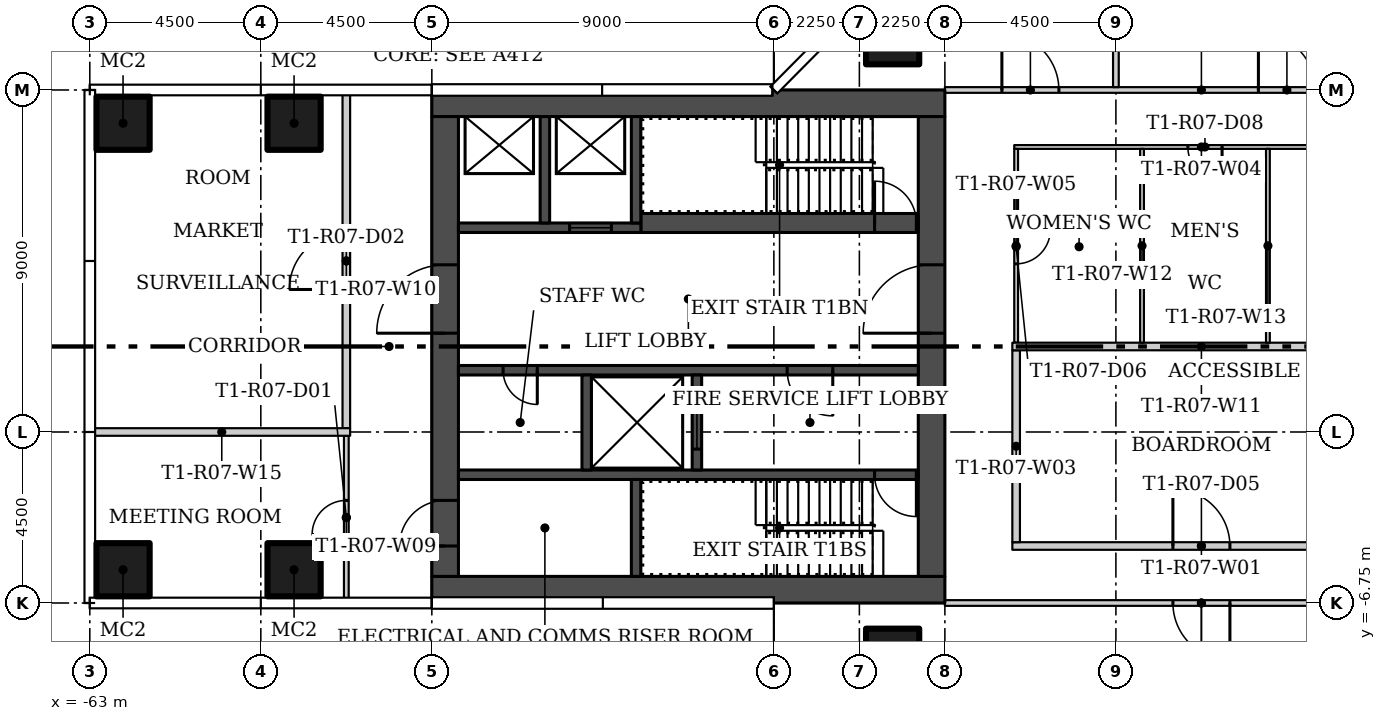
"""IFC4 building model, lengths in metres.
Left out: names, types, materials, properties, quantities, classifications, styles, units other than length and angle.
Written with IfcOpenShell. Run it as: python <this file> out.ifc"""

import sys

from ifc_helpers import new_model, si_unit, direction, frame, frame_2d, origin, origin_2d, place, context, subcontext, project, spatial, rectangle, hollow_rectangle, extrude, element, fill, save


model = new_model("IFC4")
c1 = context("Model", 3, precision=1e-05, world=origin(), true_north=direction((0.0, 1.0)))
c2 = subcontext(c1, "Body", "Model", "MODEL_VIEW")
j1 = project(units=[si_unit("LENGTHUNIT", "METRE"), si_unit("PLANEANGLEUNIT", "RADIAN")], contexts=[c1])
p1 = place(None, origin())
s1 = spatial("IfcSite", under=j1, at=p1, CompositionType="ELEMENT")
p2 = place(p1, origin())
s2 = spatial("IfcBuilding", under=s1, at=p2, CompositionType="ELEMENT")
p3 = place(p2, frame((0.0, 0.0, 69.3)))
s3 = spatial("IfcBuildingStorey", under=s2, at=p3, CompositionType="ELEMENT", Elevation=69.3)
for number, where in (
    (1, (-41.875, 8.125, 0.0)),
    (2, (-41.875, -8.125, 0.0)),
    (3, (-57.625, -5.875, 0.0)),
    (4, (-62.125, -5.875, 0.0)),
    (5, (-57.625, 5.875, 0.0)),
    (6, (-62.125, 5.875, 0.0)),
):
    element("IfcColumn", number, at=place(p3, frame(where)), inside=s3, PredefinedType="COLUMN", context=c2, shape_type="SweptSolid", body=[
        extrude(hollow_rectangle(XDim=1.4, YDim=1.4, WallThickness=0.05, at=origin_2d()), origin(), (0.0, 0.0, 1.0), 3.55),
    ])
p4 = place(p3, frame((-38.725, -5.25, 0.0)))
e7 = element("IfcWall", 7, at=p4, inside=s3, PredefinedType="PARTITIONING", context=c2, shape_type="SweptSolid", body=[
    extrude(rectangle(XDim=9.95, YDim=0.2, at=frame_2d((4.975, 0.0))), origin(), (0.0, 0.0, 1.0), 3.55),
])
p5 = place(p4, frame((4.225, 0.0, 0.0)))
e8 = element("IfcOpeningElement", 8, at=p5, cuts=e7, PredefinedType="OPENING", context=c2, shape_type="SweptSolid", body=[
    extrude(rectangle(XDim=1.5, YDim=2.4, at=frame_2d((0.75, 1.2))), frame((0.0, 0.11, 0.0), z_axis=(0.0, -1.0, 0.0), x_axis=(1.0, 0.0, 0.0)), (0.0, 0.0, 1.0), 0.22),
])
p6 = place(p3, frame((-38.625, -0.1, 0.0), z_axis=(0.0, 0.0, 1.0), x_axis=(0.0, -1.0, 0.0)))
e9 = element("IfcWall", 9, at=p6, inside=s3, PredefinedType="PARTITIONING", context=c2, shape_type="SweptSolid", body=[
    extrude(rectangle(XDim=5.05, YDim=0.2, at=frame_2d((2.525, 0.0))), origin(), (0.0, 0.0, 1.0), 3.55),
])
p7 = place(p3, frame((-28.825, 5.25, 0.0), z_axis=(0.0, 0.0, 1.0), x_axis=(-1.0, 0.0, 0.0)))
e10 = element("IfcWall", 10, at=p7, inside=s3, PredefinedType="PARTITIONING", context=c2, shape_type="SweptSolid", body=[
    extrude(rectangle(XDim=9.85, YDim=0.1, at=frame_2d((4.925, 0.0))), origin(), (0.0, 0.0, 1.0), 3.55),
])
p8 = place(p7, frame((4.381, 0.0, 0.0)))
e11 = element("IfcOpeningElement", 11, at=p8, cuts=e10, PredefinedType="OPENING", context=c2, shape_type="SweptSolid", body=[
    extrude(rectangle(XDim=0.9, YDim=2.1, at=frame_2d((0.45, 1.05))), frame((0.0, 0.06, 0.0), z_axis=(0.0, -1.0, 0.0), x_axis=(1.0, 0.0, 0.0)), (0.0, 0.0, 1.0), 0.12),
])
p9 = place(p3, frame((-38.625, 5.2, 0.0), z_axis=(0.0, 0.0, 1.0), x_axis=(0.0, -1.0, 0.0)))
e12 = element("IfcWall", 12, at=p9, inside=s3, PredefinedType="PARTITIONING", context=c2, shape_type="SweptSolid", body=[
    extrude(rectangle(XDim=5.1, YDim=0.1, at=frame_2d((2.55, 0.0))), origin(), (0.0, 0.0, 1.0), 3.55),
])
p10 = place(p9, frame((2.125, 0.0, 0.0)))
e13 = element("IfcOpeningElement", 13, at=p10, cuts=e12, PredefinedType="OPENING", context=c2, shape_type="SweptSolid", body=[
    extrude(rectangle(XDim=0.9, YDim=2.1, at=frame_2d((0.45, 1.05))), frame((0.0, 0.06, 0.0), z_axis=(0.0, -1.0, 0.0), x_axis=(1.0, 0.0, 0.0)), (0.0, 0.0, 1.0), 0.12),
])
p11 = place(p3, frame((-40.5, 6.75, 0.0)))
e14 = element("IfcWall", 14, at=p11, inside=s3, PredefinedType="PARTITIONING", context=c2, shape_type="SweptSolid", body=[
    extrude(rectangle(XDim=13.5, YDim=0.15, at=frame_2d((6.75, 0.0))), origin(), (0.0, 0.0, 1.0), 3.55),
])
p12 = place(p11, frame((1.5, 0.0, 0.0)))
e15 = element("IfcOpeningElement", 15, at=p12, cuts=e14, PredefinedType="OPENING", context=c2, shape_type="SweptSolid", body=[
    extrude(rectangle(XDim=1.5, YDim=2.1, at=frame_2d((0.75, 1.05))), frame((0.0, 0.085, 0.0), z_axis=(0.0, -1.0, 0.0), x_axis=(1.0, 0.0, 0.0)), (0.0, 0.0, 1.0), 0.17),
])
p13 = place(p11, frame((8.25, 0.0, 0.0)))
e16 = element("IfcOpeningElement", 16, at=p13, cuts=e14, PredefinedType="OPENING", context=c2, shape_type="SweptSolid", body=[
    extrude(rectangle(XDim=1.5, YDim=2.1, at=frame_2d((0.75, 1.05))), frame((0.0, 0.085, 0.0), z_axis=(0.0, -1.0, 0.0), x_axis=(1.0, 0.0, 0.0)), (0.0, 0.0, 1.0), 0.17),
])
p14 = place(p3, frame((-27.0, -6.75, 0.0), z_axis=(0.0, 0.0, 1.0), x_axis=(-1.0, 0.0, 0.0)))
e17 = element("IfcWall", 17, at=p14, inside=s3, PredefinedType="PARTITIONING", context=c2, shape_type="SweptSolid", body=[
    extrude(rectangle(XDim=13.5, YDim=0.15, at=frame_2d((6.75, 0.0))), origin(), (0.0, 0.0, 1.0), 3.55),
])
p15 = place(p14, frame((6.0, 0.0, 0.0)))
e18 = element("IfcOpeningElement", 18, at=p15, cuts=e17, PredefinedType="OPENING", context=c2, shape_type="SweptSolid", body=[
    extrude(rectangle(XDim=1.5, YDim=2.1, at=frame_2d((0.75, 1.05))), frame((0.0, 0.085, 0.0), z_axis=(0.0, -1.0, 0.0), x_axis=(1.0, 0.0, 0.0)), (0.0, 0.0, 1.0), 0.17),
])
p16 = place(p3, frame((-56.25, -6.655, 0.0), z_axis=(0.0, 0.0, 1.0), x_axis=(0.0, 1.0, 0.0)))
e19 = element("IfcWall", 19, at=p16, inside=s3, PredefinedType="PARTITIONING", context=c2, shape_type="SweptSolid", body=[
    extrude(rectangle(XDim=4.305, YDim=0.125, at=frame_2d((2.152, 0.0))), origin(), (0.0, 0.0, 1.0), 3.55),
])
p17 = place(p16, frame((1.705, 0.0, 0.0)))
e20 = element("IfcOpeningElement", 20, at=p17, cuts=e19, PredefinedType="OPENING", context=c2, shape_type="SweptSolid", body=[
    extrude(rectangle(XDim=0.9, YDim=2.1, at=frame_2d((0.45, 1.05))), frame((0.0, 0.073, 0.0), z_axis=(0.0, -1.0, 0.0), x_axis=(1.0, 0.0, 0.0)), (0.0, 0.0, 1.0), 0.145),
])
p18 = place(p3, frame((-56.25, -2.15, 0.0), z_axis=(0.0, 0.0, 1.0), x_axis=(0.0, 1.0, 0.0)))
e21 = element("IfcWall", 21, at=p18, inside=s3, PredefinedType="PARTITIONING", context=c2, shape_type="SweptSolid", body=[
    extrude(rectangle(XDim=8.805, YDim=0.2, at=frame_2d((4.402, 0.0))), origin(), (0.0, 0.0, 1.0), 3.55),
])
p19 = place(p18, frame((3.65, 0.0, 0.0)))
e22 = element("IfcOpeningElement", 22, at=p19, cuts=e21, PredefinedType="OPENING", context=c2, shape_type="SweptSolid", body=[
    extrude(rectangle(XDim=1.5, YDim=2.1, at=frame_2d((0.75, 1.05))), frame((0.0, 0.11, 0.0), z_axis=(0.0, -1.0, 0.0), x_axis=(1.0, 0.0, 0.0)), (0.0, 0.0, 1.0), 0.22),
])
p20 = place(p3, frame((-28.775, 0.0, 0.0), z_axis=(0.0, 0.0, 1.0), x_axis=(-1.0, 0.0, 0.0)))
e23 = element("IfcWall", 23, at=p20, inside=s3, PredefinedType="PARTITIONING", context=c2, shape_type="SweptSolid", body=[
    extrude(rectangle(XDim=9.95, YDim=0.2, at=frame_2d((4.975, 0.0))), origin(), (0.0, 0.0, 1.0), 3.55),
])
for number, where, z_axis, x_axis in (
    (24, (-35.312, 0.1, 0.0), (0.0, 0.0, 1.0), (0.0, 1.0, 0.0)),
    (25, (-32.0, 0.1, 0.0), (0.0, 0.0, 1.0), (0.0, 1.0, 0.0)),
):
    element("IfcWall", number, at=place(p3, frame(where, z_axis=z_axis, x_axis=x_axis)), inside=s3, PredefinedType="PARTITIONING", context=c2, shape_type="SweptSolid", body=[
        extrude(rectangle(XDim=5.1, YDim=0.1, at=frame_2d((2.55, 0.0))), origin(), (0.0, 0.0, 1.0), 3.55),
    ])
p21 = place(p3, frame((-36.0, 6.825, 0.0), z_axis=(0.0, 0.0, 1.0), x_axis=(0.0, 1.0, 0.0)))
e26 = element("IfcWall", 26, at=p21, inside=s3, PredefinedType="PARTITIONING", context=c2, shape_type="SweptSolid", body=[
    extrude(rectangle(XDim=17.83, YDim=0.15, at=frame_2d((8.915, 0.0))), origin(), (0.0, 0.0, 1.0), 3.55),
])
p22 = place(p3, frame((-56.15, -2.25, 0.0), z_axis=(0.0, 0.0, 1.0), x_axis=(-1.0, 0.0, 0.0)))
e27 = element("IfcWall", 27, at=p22, inside=s3, PredefinedType="PARTITIONING", context=c2, shape_type="SweptSolid", body=[
    extrude(rectangle(XDim=6.755, YDim=0.2, at=frame_2d((3.377, 0.0))), origin(), (0.0, 0.0, 1.0), 3.55),
])
for number, where, z_axis, x_axis in (
    (28, (-40.5, -6.4, 0.0), (0.0, 0.0, 1.0), (-1.0, 0.0, 0.0)),
    (29, (-40.5, 6.4, 0.0), (0.0, 0.0, 1.0), (-1.0, 0.0, 0.0)),
):
    element("IfcWall", number, at=place(p3, frame(where, z_axis=z_axis, x_axis=x_axis)), inside=s3, PredefinedType="SHEAR", context=c2, shape_type="SweptSolid", body=[
        extrude(rectangle(XDim=13.5, YDim=0.7, at=frame_2d((6.75, 0.0))), origin(), (0.0, 0.0, 1.0), 3.55),
    ])
p23 = place(p3, frame((-40.85, -6.05, 0.0), z_axis=(0.0, 0.0, 1.0), x_axis=(0.0, 1.0, 0.0)))
e30 = element("IfcWall", 30, at=p23, inside=s3, PredefinedType="SHEAR", context=c2, shape_type="SweptSolid", body=[
    extrude(rectangle(XDim=12.1, YDim=0.7, at=frame_2d((6.05, 0.0))), origin(), (0.0, 0.0, 1.0), 3.55),
])
p24 = place(p23, frame((6.4, 0.0, 0.0)))
e31 = element("IfcOpeningElement", 31, at=p24, cuts=e30, PredefinedType="OPENING", context=c2, shape_type="SweptSolid", body=[
    extrude(rectangle(XDim=1.8, YDim=2.4, at=frame_2d((0.9, 1.2))), frame((0.0, 0.36, 0.0), z_axis=(0.0, -1.0, 0.0), x_axis=(1.0, 0.0, 0.0)), (0.0, 0.0, 1.0), 0.72),
])
p25 = place(p3, frame((-53.65, -6.05, 0.0), z_axis=(0.0, 0.0, 1.0), x_axis=(0.0, 1.0, 0.0)))
e32 = element("IfcWall", 32, at=p25, inside=s3, PredefinedType="SHEAR", context=c2, shape_type="SweptSolid", body=[
    extrude(rectangle(XDim=12.1, YDim=0.7, at=frame_2d((6.05, 0.0))), origin(), (0.0, 0.0, 1.0), 3.55),
])
p26 = place(p25, frame((0.8, 0.0, 0.0)))
e33 = element("IfcOpeningElement", 33, at=p26, cuts=e32, PredefinedType="OPENING", context=c2, shape_type="SweptSolid", body=[
    extrude(rectangle(XDim=1.2, YDim=2.1, at=frame_2d((0.6, 1.05))), frame((0.0, 0.36, 0.0), z_axis=(0.0, -1.0, 0.0), x_axis=(1.0, 0.0, 0.0)), (0.0, 0.0, 1.0), 0.72),
])
p27 = place(p25, frame((6.4, 0.0, 0.0)))
e34 = element("IfcOpeningElement", 34, at=p27, cuts=e32, PredefinedType="OPENING", context=c2, shape_type="SweptSolid", body=[
    extrude(rectangle(XDim=1.8, YDim=2.4, at=frame_2d((0.9, 1.2))), frame((0.0, 0.36, 0.0), z_axis=(0.0, -1.0, 0.0), x_axis=(1.0, 0.0, 0.0)), (0.0, 0.0, 1.0), 0.72),
])
p28 = place(p3, frame((-41.2, -3.375, 0.0), z_axis=(0.0, 0.0, 1.0), x_axis=(-1.0, 0.0, 0.0)))
e35 = element("IfcWall", 35, at=p28, inside=s3, PredefinedType="SHEAR", context=c2, shape_type="SweptSolid", body=[
    extrude(rectangle(XDim=12.1, YDim=0.25, at=frame_2d((6.05, 0.0))), origin(), (0.0, 0.0, 1.0), 3.55),
])
p29 = place(p28, frame((0.05, 0.0, 0.0)))
e36 = element("IfcOpeningElement", 36, at=p29, cuts=e35, PredefinedType="OPENING", context=c2, shape_type="SweptSolid", body=[
    extrude(rectangle(XDim=1.1, YDim=2.1, at=frame_2d((0.55, 1.05))), frame((0.0, 0.135, 0.0), z_axis=(0.0, -1.0, 0.0), x_axis=(1.0, 0.0, 0.0)), (0.0, 0.0, 1.0), 0.27),
])
p30 = place(p3, frame((-48.625, -6.05, 0.0), z_axis=(0.0, 0.0, 1.0), x_axis=(0.0, 1.0, 0.0)))
e37 = element("IfcWall", 37, at=p30, inside=s3, PredefinedType="SHEAR", context=c2, shape_type="SweptSolid", body=[
    extrude(rectangle(XDim=2.55, YDim=0.25, at=frame_2d((1.275, 0.0))), origin(), (0.0, 0.0, 1.0), 3.55),
])
p31 = place(p3, frame((-41.2, -0.625, 0.0), z_axis=(0.0, 0.0, 1.0), x_axis=(-1.0, 0.0, 0.0)))
e38 = element("IfcWall", 38, at=p31, inside=s3, PredefinedType="SHEAR", context=c2, shape_type="SweptSolid", body=[
    extrude(rectangle(XDim=12.1, YDim=0.25, at=frame_2d((6.05, 0.0))), origin(), (0.0, 0.0, 1.0), 3.55),
])
p32 = place(p31, frame((2.25, 0.0, 0.0)))
e39 = element("IfcOpeningElement", 39, at=p32, cuts=e38, PredefinedType="OPENING", context=c2, shape_type="SweptSolid", body=[
    extrude(rectangle(XDim=1.2, YDim=2.1, at=frame_2d((0.6, 1.05))), frame((0.0, 0.135, 0.0), z_axis=(0.0, -1.0, 0.0), x_axis=(1.0, 0.0, 0.0)), (0.0, 0.0, 1.0), 0.27),
])
p33 = place(p31, frame((10.025, 0.0, 0.0)))
e40 = element("IfcOpeningElement", 40, at=p33, cuts=e38, PredefinedType="OPENING", context=c2, shape_type="SweptSolid", body=[
    extrude(rectangle(XDim=0.9, YDim=2.1, at=frame_2d((0.45, 1.05))), frame((0.0, 0.135, 0.0), z_axis=(0.0, -1.0, 0.0), x_axis=(1.0, 0.0, 0.0)), (0.0, 0.0, 1.0), 0.27),
])
p34 = place(p3, frame((-47.025, -3.25, 0.0), z_axis=(0.0, 0.0, 1.0), x_axis=(0.0, 1.0, 0.0)))
e41 = element("IfcWall", 41, at=p34, inside=s3, PredefinedType="SHEAR", context=c2, shape_type="SweptSolid", body=[
    extrude(rectangle(XDim=2.5, YDim=0.25, at=frame_2d((1.25, 0.0))), origin(), (0.0, 0.0, 1.0), 3.55),
])
p35 = place(p34, frame((0.55, 0.0, 0.0)))
e42 = element("IfcOpeningElement", 42, at=p35, cuts=e41, PredefinedType="OPENING", context=c2, shape_type="SweptSolid", body=[
    extrude(rectangle(XDim=1.4, YDim=2.4, at=frame_2d((0.7, 1.2))), frame((0.0, 0.135, 0.0), z_axis=(0.0, -1.0, 0.0), x_axis=(1.0, 0.0, 0.0)), (0.0, 0.0, 1.0), 0.27),
])
p36 = place(p3, frame((-49.925, -3.25, 0.0), z_axis=(0.0, 0.0, 1.0), x_axis=(0.0, 1.0, 0.0)))
e43 = element("IfcWall", 43, at=p36, inside=s3, PredefinedType="SHEAR", context=c2, shape_type="SweptSolid", body=[
    extrude(rectangle(XDim=2.5, YDim=0.25, at=frame_2d((1.25, 0.0))), origin(), (0.0, 0.0, 1.0), 3.55),
])
p37 = place(p3, frame((-48.5, 3.25, 0.0)))
e44 = element("IfcWall", 44, at=p37, inside=s3, PredefinedType="SHEAR", context=c2, shape_type="SweptSolid", body=[
    extrude(rectangle(XDim=7.3, YDim=0.5, at=frame_2d((3.65, 0.0))), origin(), (0.0, 0.0, 1.0), 3.55),
])
p38 = place(p37, frame((6.15, 0.0, 0.0)))
e45 = element("IfcOpeningElement", 45, at=p38, cuts=e44, PredefinedType="OPENING", context=c2, shape_type="SweptSolid", body=[
    extrude(rectangle(XDim=1.1, YDim=2.1, at=frame_2d((0.55, 1.05))), frame((0.0, 0.26, 0.0), z_axis=(0.0, -1.0, 0.0), x_axis=(1.0, 0.0, 0.0)), (0.0, 0.0, 1.0), 0.52),
])
p39 = place(p3, frame((-48.5, 3.125, 0.0), z_axis=(0.0, 0.0, 1.0), x_axis=(-1.0, 0.0, 0.0)))
e46 = element("IfcWall", 46, at=p39, inside=s3, PredefinedType="SHEAR", context=c2, shape_type="SweptSolid", body=[
    extrude(rectangle(XDim=4.8, YDim=0.25, at=frame_2d((2.4, 0.0))), origin(), (0.0, 0.0, 1.0), 3.55),
])
p40 = place(p39, frame((0.775, 0.0, 0.0)))
e47 = element("IfcOpeningElement", 47, at=p40, cuts=e46, PredefinedType="OPENING", context=c2, shape_type="SweptSolid", body=[
    extrude(rectangle(XDim=1.1, YDim=2.1, at=frame_2d((0.55, 1.05))), frame((0.0, 0.135, 0.0), z_axis=(0.0, -1.0, 0.0), x_axis=(1.0, 0.0, 0.0)), (0.0, 0.0, 1.0), 0.27),
])
for number, where, z_axis, x_axis in (
    (48, (-48.625, 3.25, 0.0), (0.0, 0.0, 1.0), (0.0, 1.0, 0.0)),
    (49, (-51.025, 3.25, 0.0), (0.0, 0.0, 1.0), (0.0, 1.0, 0.0)),
):
    element("IfcWall", number, at=place(p3, frame(where, z_axis=z_axis, x_axis=x_axis)), inside=s3, PredefinedType="SHEAR", context=c2, shape_type="SweptSolid", body=[
        extrude(rectangle(XDim=2.8, YDim=0.25, at=frame_2d((1.4, 0.0))), origin(), (0.0, 0.0, 1.0), 3.55),
    ])
p41 = place(p17, origin())
e50 = element("IfcDoor", 50, at=p41, inside=s3, OperationType="SINGLE_SWING_RIGHT", PredefinedType="DOOR", context=c2, shape_type="SweptSolid", body=[
    extrude(rectangle(XDim=0.9, YDim=2.1, at=frame_2d((0.45, 1.05))), frame((0.0, 0.025, 0.0), z_axis=(0.0, -1.0, 0.0), x_axis=(1.0, 0.0, 0.0)), (0.0, 0.0, 1.0), 0.05),
])
fill(e20, e50)
p42 = place(p19, origin())
e51 = element("IfcDoor", 51, at=p42, inside=s3, OperationType="DOUBLE_DOOR_SINGLE_SWING", PredefinedType="DOOR", context=c2, shape_type="SweptSolid", body=[
    extrude(rectangle(XDim=1.5, YDim=2.1, at=frame_2d((0.75, 1.05))), frame((0.0, 0.025, 0.0), z_axis=(0.0, -1.0, 0.0), x_axis=(1.0, 0.0, 0.0)), (0.0, 0.0, 1.0), 0.05),
])
fill(e22, e51)
p43 = place(p12, origin())
e52 = element("IfcDoor", 52, at=p43, inside=s3, OperationType="DOUBLE_DOOR_SINGLE_SWING", PredefinedType="DOOR", context=c2, shape_type="SweptSolid", body=[
    extrude(rectangle(XDim=1.5, YDim=2.1, at=frame_2d((0.75, 1.05))), frame((0.0, 0.025, 0.0), z_axis=(0.0, -1.0, 0.0), x_axis=(1.0, 0.0, 0.0)), (0.0, 0.0, 1.0), 0.05),
])
fill(e15, e52)
p44 = place(p13, origin())
e53 = element("IfcDoor", 53, at=p44, inside=s3, OperationType="DOUBLE_DOOR_SINGLE_SWING", PredefinedType="DOOR", context=c2, shape_type="SweptSolid", body=[
    extrude(rectangle(XDim=1.5, YDim=2.1, at=frame_2d((0.75, 1.05))), frame((0.0, 0.025, 0.0), z_axis=(0.0, -1.0, 0.0), x_axis=(1.0, 0.0, 0.0)), (0.0, 0.0, 1.0), 0.05),
])
fill(e16, e53)
p45 = place(p5, origin())
e54 = element("IfcDoor", 54, at=p45, inside=s3, OperationType="DOUBLE_DOOR_SINGLE_SWING", PredefinedType="DOOR", context=c2, shape_type="SweptSolid", body=[
    extrude(rectangle(XDim=1.5, YDim=2.4, at=frame_2d((0.75, 1.2))), frame((0.0, 0.025, 0.0), z_axis=(0.0, -1.0, 0.0), x_axis=(1.0, 0.0, 0.0)), (0.0, 0.0, 1.0), 0.05),
])
fill(e8, e54)
p46 = place(p10, origin())
e55 = element("IfcDoor", 55, at=p46, inside=s3, OperationType="SINGLE_SWING_LEFT", PredefinedType="DOOR", context=c2, shape_type="SweptSolid", body=[
    extrude(rectangle(XDim=0.9, YDim=2.1, at=frame_2d((0.45, 1.05))), frame((0.0, 0.025, 0.0), z_axis=(0.0, -1.0, 0.0), x_axis=(1.0, 0.0, 0.0)), (0.0, 0.0, 1.0), 0.05),
])
fill(e13, e55)
p47 = place(p8, origin())
e56 = element("IfcDoor", 56, at=p47, inside=s3, OperationType="SINGLE_SWING_RIGHT", PredefinedType="DOOR", context=c2, shape_type="SweptSolid", body=[
    extrude(rectangle(XDim=0.9, YDim=2.1, at=frame_2d((0.45, 1.05))), frame((0.0, 0.025, 0.0), z_axis=(0.0, -1.0, 0.0), x_axis=(1.0, 0.0, 0.0)), (0.0, 0.0, 1.0), 0.05),
])
fill(e11, e56)
p48 = place(p15, origin())
e57 = element("IfcDoor", 57, at=p48, inside=s3, OperationType="DOUBLE_DOOR_SINGLE_SWING", PredefinedType="DOOR", context=c2, shape_type="SweptSolid", body=[
    extrude(rectangle(XDim=1.5, YDim=2.1, at=frame_2d((0.75, 1.05))), frame((0.0, 0.025, 0.0), z_axis=(0.0, -1.0, 0.0), x_axis=(1.0, 0.0, 0.0)), (0.0, 0.0, 1.0), 0.05),
])
fill(e18, e57)
p49 = place(p24, origin())
e58 = element("IfcDoor", 58, at=p49, inside=s3, OperationType="DOUBLE_DOOR_SINGLE_SWING", PredefinedType="DOOR", context=c2, shape_type="SweptSolid", body=[
    extrude(rectangle(XDim=1.8, YDim=2.4, at=frame_2d((0.9, 1.2))), frame((0.0, 0.025, 0.0), z_axis=(0.0, -1.0, 0.0), x_axis=(1.0, 0.0, 0.0)), (0.0, 0.0, 1.0), 0.05),
])
fill(e31, e58)
p50 = place(p26, origin())
e59 = element("IfcDoor", 59, at=p50, inside=s3, OperationType="SINGLE_SWING_LEFT", PredefinedType="DOOR", context=c2, shape_type="SweptSolid", body=[
    extrude(rectangle(XDim=1.2, YDim=2.1, at=frame_2d((0.6, 1.05))), frame((0.0, 0.025, 0.0), z_axis=(0.0, -1.0, 0.0), x_axis=(1.0, 0.0, 0.0)), (0.0, 0.0, 1.0), 0.05),
])
fill(e33, e59)
p51 = place(p27, origin())
e60 = element("IfcDoor", 60, at=p51, inside=s3, OperationType="DOUBLE_DOOR_SINGLE_SWING", PredefinedType="DOOR", context=c2, shape_type="SweptSolid", body=[
    extrude(rectangle(XDim=1.8, YDim=2.4, at=frame_2d((0.9, 1.2))), frame((0.0, 0.025, 0.0), z_axis=(0.0, -1.0, 0.0), x_axis=(1.0, 0.0, 0.0)), (0.0, 0.0, 1.0), 0.05),
])
fill(e34, e60)
p52 = place(p29, origin())
e61 = element("IfcDoor", 61, at=p52, inside=s3, OperationType="SINGLE_SWING_LEFT", PredefinedType="DOOR", context=c2, shape_type="SweptSolid", body=[
    extrude(rectangle(XDim=1.1, YDim=2.1, at=frame_2d((0.55, 1.05))), frame((0.0, 0.025, 0.0), z_axis=(0.0, -1.0, 0.0), x_axis=(1.0, 0.0, 0.0)), (0.0, 0.0, 1.0), 0.05),
])
fill(e36, e61)
p53 = place(p32, origin())
e62 = element("IfcDoor", 62, at=p53, inside=s3, OperationType="SINGLE_SWING_LEFT", PredefinedType="DOOR", context=c2, shape_type="SweptSolid", body=[
    extrude(rectangle(XDim=1.2, YDim=2.1, at=frame_2d((0.6, 1.05))), frame((0.0, 0.025, 0.0), z_axis=(0.0, -1.0, 0.0), x_axis=(1.0, 0.0, 0.0)), (0.0, 0.0, 1.0), 0.05),
])
fill(e39, e62)
p54 = place(p33, origin())
e63 = element("IfcDoor", 63, at=p54, inside=s3, OperationType="SINGLE_SWING_RIGHT", PredefinedType="DOOR", context=c2, shape_type="SweptSolid", body=[
    extrude(rectangle(XDim=0.9, YDim=2.1, at=frame_2d((0.45, 1.05))), frame((0.0, 0.025, 0.0), z_axis=(0.0, -1.0, 0.0), x_axis=(1.0, 0.0, 0.0)), (0.0, 0.0, 1.0), 0.05),
])
fill(e40, e63)
p55 = place(p35, origin())
e64 = element("IfcDoor", 64, at=p55, inside=s3, OperationType="SLIDING_TO_LEFT", PredefinedType="DOOR", context=c2, shape_type="SweptSolid", body=[
    extrude(rectangle(XDim=1.4, YDim=2.4, at=frame_2d((0.7, 1.2))), frame((0.0, 0.025, 0.0), z_axis=(0.0, -1.0, 0.0), x_axis=(1.0, 0.0, 0.0)), (0.0, 0.0, 1.0), 0.05),
])
fill(e42, e64)
p56 = place(p38, origin())
e65 = element("IfcDoor", 65, at=p56, inside=s3, OperationType="SINGLE_SWING_RIGHT", PredefinedType="DOOR", context=c2, shape_type="SweptSolid", body=[
    extrude(rectangle(XDim=1.1, YDim=2.1, at=frame_2d((0.55, 1.05))), frame((0.0, 0.025, 0.0), z_axis=(0.0, -1.0, 0.0), x_axis=(1.0, 0.0, 0.0)), (0.0, 0.0, 1.0), 0.05),
])
fill(e45, e65)
p57 = place(p40, origin())
e66 = element("IfcDoor", 66, at=p57, inside=s3, OperationType="SLIDING_TO_LEFT", PredefinedType="DOOR", context=c2, shape_type="SweptSolid", body=[
    extrude(rectangle(XDim=1.1, YDim=2.1, at=frame_2d((0.55, 1.05))), frame((0.0, 0.025, 0.0), z_axis=(0.0, -1.0, 0.0), x_axis=(1.0, 0.0, 0.0)), (0.0, 0.0, 1.0), 0.05),
])
fill(e47, e66)
save(model, sys.argv[1])
